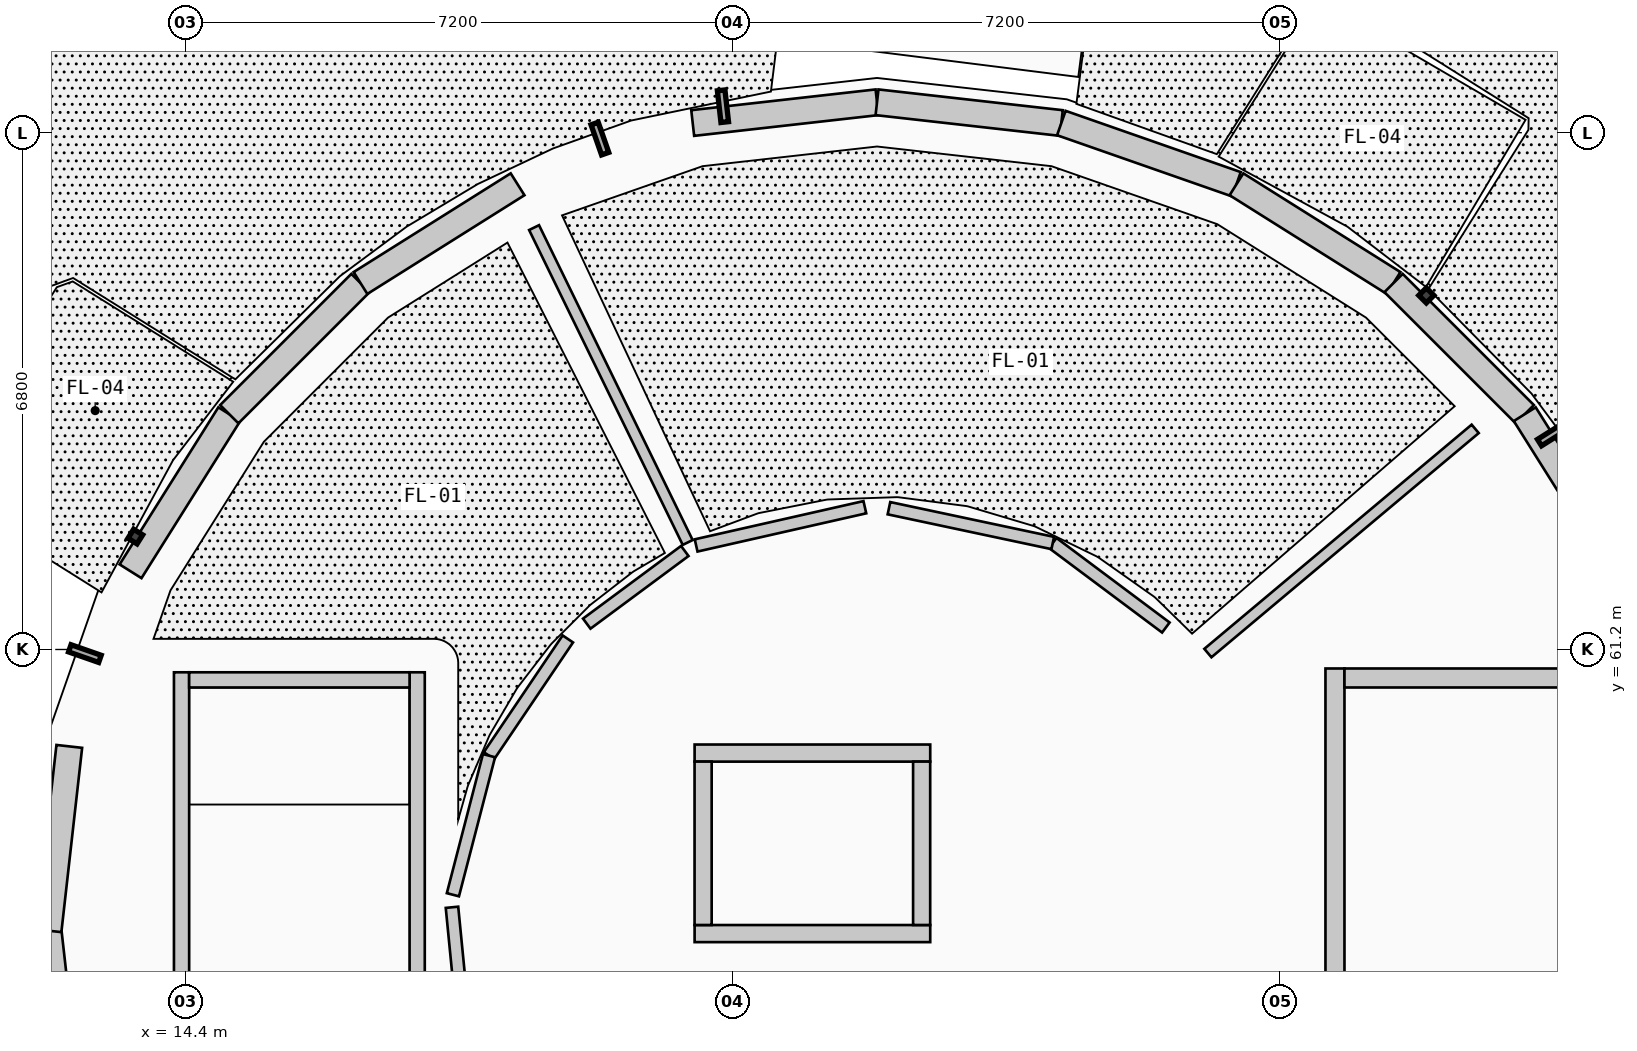
"""IFC4 building model, lengths in metres.
Left out: names, types, materials, properties, quantities, classifications, styles, units other than length and angle.
Written with IfcOpenShell. Run it as: python <this file> out.ifc"""

import sys

from ifc_helpers import new_model, si_unit, direction, frame, frame_2d, origin, origin_2d, place, context, subcontext, project, spatial, rectangle, circle, extrude, element, fill, save


model = new_model("IFC4")
c1 = context("Model", 3, precision=1e-05, world=origin(), true_north=direction((0.0, 1.0)))
c2 = subcontext(c1, "Body", "Model", "MODEL_VIEW")
j1 = project(units=[si_unit("LENGTHUNIT", "METRE"), si_unit("PLANEANGLEUNIT", "RADIAN")], contexts=[c1])
p1 = place(None, origin())
s1 = spatial("IfcSite", under=j1, at=p1, CompositionType="ELEMENT")
p2 = place(p1, origin())
s2 = spatial("IfcBuilding", under=s1, at=p2, CompositionType="ELEMENT")
p3 = place(p2, origin())
s3 = spatial("IfcBuildingStorey", under=s2, at=p3, CompositionType="ELEMENT", Elevation=0.0)
for number, where, z_axis, x_axis in (
    (1, (29.972, 65.615, 0.0), (0.0, 0.0, 1.0), (1.0, 0.0, 0.0)),
    (2, (25.81, 67.62, 0.0), (0.0, 0.0, 1.0), (1.0, 0.0, 0.0)),
    (3, (21.19, 67.62, 0.0), (0.0, 0.0, 1.0), (1.0, 0.0, 0.0)),
    (4, (17.028, 65.615, 0.0), (0.0, 0.0, 1.0), (1.0, 0.0, 0.0)),
    (5, (14.148, 62.004, 0.0), (0.0, 0.0, 1.0), (1.0, 0.0, 0.0)),
    (6, (13.12, 57.5, 0.0), (0.0, 0.0, 1.0), (1.0, 0.0, 0.0)),
):
    element("IfcColumn", number, at=place(p3, frame(where, z_axis=z_axis, x_axis=x_axis)), inside=s3, PredefinedType="PILASTER", context=c2, shape_type="SweptSolid", body=[
        extrude(circle(Radius=0.275, at=origin_2d()), origin(), (0.0, 0.0, 1.0), 4.55),
    ])
for number, where, z_axis, x_axis in (
    (7, (27.46, 61.46, 0.0), (0.0, 0.0, 1.0), (1.0, 0.0, 0.0)),
    (8, (23.5, 63.1, 0.0), (0.0, 0.0, 1.0), (1.0, 0.0, 0.0)),
    (9, (19.54, 61.46, 0.0), (0.0, 0.0, 1.0), (1.0, 0.0, 0.0)),
):
    element("IfcColumn", number, at=place(p3, frame(where, z_axis=z_axis, x_axis=x_axis)), inside=s3, PredefinedType="COLUMN", context=c2, shape_type="SweptSolid", body=[
        extrude(rectangle(XDim=0.315, YDim=0.315, at=origin_2d()), origin(), (0.0, 0.0, 1.0), 4.55),
    ])
p4 = place(p3, frame((25.966, 68.887, 0.0), z_axis=(0.0, 0.0, 1.0), x_axis=(1.0, 0.0, 0.0)))
e10 = element("IfcColumn", 10, at=p4, inside=s3, PredefinedType="PILASTER", context=c2, shape_type="SweptSolid", body=[
    extrude(circle(Radius=0.275, at=origin_2d()), origin(), (0.0, 0.0, 1.0), 4.55),
])
for number, where, z_axis, x_axis in (
    (11, (31.387, 67.39, 1.15), (0.0, 0.0, 1.0), (1.0, 0.0, 0.0)),
    (12, (15.613, 67.39, 1.15), (0.0, 0.0, 1.0), (1.0, 0.0, 0.0)),
):
    element("IfcColumn", number, at=place(p3, frame(where, z_axis=z_axis, x_axis=x_axis)), inside=s3, PredefinedType="PILASTER", context=c2, shape_type="SweptSolid", body=[
        extrude(circle(Radius=0.19, at=origin_2d()), origin(), (0.0, 0.0, 1.0), 3.4),
    ])
for number, where, z_axis, x_axis in (
    (13, (12.873, 55.075, 0.0), (0.0, 0.0, 1.0), (-0.112, 0.994, 0.0)),
    (14, (12.6, 57.5, 0.0), (0.0, 0.0, 1.0), (0.112, 0.994, 0.0)),
):
    element("IfcWall", number, at=place(p3, frame(where, z_axis=z_axis, x_axis=x_axis)), inside=s3, PredefinedType="SOLIDWALL", context=c2, shape_type="SweptSolid", body=[
        extrude(rectangle(XDim=2.44, YDim=0.34, at=frame_2d((1.22, 0.0))), origin(), (0.0, 0.0, 1.0), 3.659),
    ])
p5 = place(p3, frame((13.679, 62.229, 0.0), z_axis=(0.0, 0.0, 1.0), x_axis=(0.532136726684, 0.846658434148, 0.0)))
e15 = element("IfcWall", 15, at=p5, inside=s3, PredefinedType="SOLIDWALL", context=c2, shape_type="SweptSolid", body=[
    extrude(rectangle(XDim=2.441, YDim=0.34, at=frame_2d((1.221, 0.0))), origin(), (0.0, 0.0, 1.0), 3.659),
])
p6 = place(p5, frame((0.521, 0.0, 0.0)))
e16 = element("IfcOpeningElement", 16, at=p6, cuts=e15, PredefinedType="OPENING", context=c2, shape_type="SweptSolid", body=[
    extrude(rectangle(XDim=1.4, YDim=2.3, at=frame_2d((0.7, 1.15))), frame((0.0, 0.18, 0.0), z_axis=(0.0, -1.0, 0.0), x_axis=(1.0, 0.0, 0.0)), (0.0, 0.0, 1.0), 0.36),
])
p7 = place(p3, frame((14.978, 64.296, 0.0), z_axis=(0.0, 0.0, 1.0), x_axis=(0.707106781187, 0.707106781187, 0.0)))
e17 = element("IfcWall", 17, at=p7, inside=s3, PredefinedType="SOLIDWALL", context=c2, shape_type="SweptSolid", body=[
    extrude(rectangle(XDim=2.441, YDim=0.34, at=frame_2d((1.22, 0.0))), origin(), (0.0, 0.0, 1.0), 3.659),
])
p8 = place(p3, frame((16.704, 66.022, 0.0), z_axis=(0.0, 0.0, 1.0), x_axis=(0.846658434148, 0.532136726684, 0.0)))
e18 = element("IfcWall", 18, at=p8, inside=s3, PredefinedType="SOLIDWALL", context=c2, shape_type="SweptSolid", body=[
    extrude(rectangle(XDim=2.441, YDim=0.34, at=frame_2d((1.221, 0.0))), origin(), (0.0, 0.0, 1.0), 3.659),
])
for number, where, z_axis, x_axis in (
    (19, (21.075, 68.127, 0.0), (0.0, 0.0, 1.0), (0.994, 0.112, 0.0)),
    (20, (23.5, 68.4, 0.0), (0.0, 0.0, 1.0), (0.994, -0.112, 0.0)),
):
    element("IfcWall", number, at=place(p3, frame(where, z_axis=z_axis, x_axis=x_axis)), inside=s3, PredefinedType="SOLIDWALL", context=c2, shape_type="SweptSolid", body=[
        extrude(rectangle(XDim=2.44, YDim=0.34, at=frame_2d((1.22, 0.0))), origin(), (0.0, 0.0, 1.0), 3.659),
    ])
p9 = place(p3, frame((25.925, 68.127, 0.0), z_axis=(0.0, 0.0, 1.0), x_axis=(0.943919156274, -0.330176659411, 0.0)))
e21 = element("IfcWall", 21, at=p9, inside=s3, PredefinedType="SOLIDWALL", context=c2, shape_type="SweptSolid", body=[
    extrude(rectangle(XDim=2.441, YDim=0.34, at=frame_2d((1.22, 0.0))), origin(), (0.0, 0.0, 1.0), 3.659),
])
p10 = place(p3, frame((28.229, 67.321, 0.0), z_axis=(0.0, 0.0, 1.0), x_axis=(0.846658434148, -0.532136726684, 0.0)))
e22 = element("IfcWall", 22, at=p10, inside=s3, PredefinedType="SOLIDWALL", context=c2, shape_type="SweptSolid", body=[
    extrude(rectangle(XDim=2.441, YDim=0.34, at=frame_2d((1.221, 0.0))), origin(), (0.0, 0.0, 1.0), 3.659),
])
p11 = place(p10, frame((0.571, 0.0, 0.0)))
e23 = element("IfcOpeningElement", 23, at=p11, cuts=e22, PredefinedType="OPENING", context=c2, shape_type="SweptSolid", body=[
    extrude(rectangle(XDim=1.3, YDim=2.25, at=frame_2d((0.65, 1.125))), frame((0.0, 0.18, 0.0), z_axis=(0.0, -1.0, 0.0), x_axis=(1.0, 0.0, 0.0)), (0.0, 0.0, 1.0), 0.36),
])
p12 = place(p3, frame((30.296, 66.022, 0.0), z_axis=(0.0, 0.0, 1.0), x_axis=(0.707106781187, -0.707106781187, 0.0)))
e24 = element("IfcWall", 24, at=p12, inside=s3, PredefinedType="SOLIDWALL", context=c2, shape_type="SweptSolid", body=[
    extrude(rectangle(XDim=2.441, YDim=0.34, at=frame_2d((1.22, 0.0))), origin(), (0.0, 0.0, 1.0), 3.659),
])
p13 = place(p3, frame((32.022, 64.296, 0.0), z_axis=(0.0, 0.0, 1.0), x_axis=(0.532136726684, -0.846658434148, 0.0)))
e25 = element("IfcWall", 25, at=p13, inside=s3, PredefinedType="SOLIDWALL", context=c2, shape_type="SweptSolid", body=[
    extrude(rectangle(XDim=2.441, YDim=0.34, at=frame_2d((1.221, 0.0))), origin(), (0.0, 0.0, 1.0), 3.659),
])
p14 = place(p3, frame((29.525, 60.95, 0.0), z_axis=(0.0, 0.0, 1.0), x_axis=(0.0, -1.0, 0.0)))
e26 = element("IfcWall", 26, at=p14, inside=s3, PredefinedType="SHEAR", context=c2, shape_type="SweptSolid", body=[
    extrude(rectangle(XDim=6.9, YDim=0.25, at=frame_2d((3.45, 0.0))), origin(), (0.0, 0.0, 1.0), 4.305),
])
p15 = place(p14, frame((0.43, 0.0, 0.0)))
e27 = element("IfcOpeningElement", 27, at=p15, cuts=e26, PredefinedType="OPENING", context=c2, shape_type="SweptSolid", body=[
    extrude(rectangle(XDim=1.1, YDim=2.15, at=frame_2d((0.55, 1.075))), frame((0.0, 0.135, 0.0), z_axis=(0.0, -1.0, 0.0), x_axis=(1.0, 0.0, 0.0)), (0.0, 0.0, 1.0), 0.27),
])
p16 = place(p3, frame((29.65, 60.825, 0.0), z_axis=(0.0, 0.0, 1.0), x_axis=(1.0, 0.0, 0.0)))
e28 = element("IfcWall", 28, at=p16, inside=s3, PredefinedType="SHEAR", context=c2, shape_type="SweptSolid", body=[
    extrude(rectangle(XDim=2.9, YDim=0.25, at=frame_2d((1.45, 0.0))), origin(), (0.0, 0.0, 1.0), 4.305),
])
p17 = place(p3, frame((17.45, 54.1, 0.0), z_axis=(0.0, 0.0, 1.0), x_axis=(0.0, 1.0, 0.0)))
e29 = element("IfcWall", 29, at=p17, inside=s3, PredefinedType="SHEAR", context=c2, shape_type="SweptSolid", body=[
    extrude(rectangle(XDim=6.8, YDim=0.2, at=frame_2d((3.4, 0.0))), origin(), (0.0, 0.0, 1.0), 4.305),
])
p18 = place(p17, frame((0.38, 0.0, 0.0)))
e30 = element("IfcOpeningElement", 30, at=p18, cuts=e29, PredefinedType="OPENING", context=c2, shape_type="SweptSolid", body=[
    extrude(rectangle(XDim=1.05, YDim=2.15, at=frame_2d((0.525, 1.075))), frame((0.0, 0.11, 0.0), z_axis=(0.0, -1.0, 0.0), x_axis=(1.0, 0.0, 0.0)), (0.0, 0.0, 1.0), 0.22),
])
p19 = place(p3, frame((14.35, 54.1, 0.0), z_axis=(0.0, 0.0, 1.0), x_axis=(0.0, 1.0, 0.0)))
e31 = element("IfcWall", 31, at=p19, inside=s3, PredefinedType="SHEAR", context=c2, shape_type="SweptSolid", body=[
    extrude(rectangle(XDim=6.8, YDim=0.2, at=frame_2d((3.4, 0.0))), origin(), (0.0, 0.0, 1.0), 4.305),
])
p20 = place(p3, frame((17.35, 60.8, 0.0), z_axis=(0.0, 0.0, 1.0), x_axis=(-1.0, 0.0, 0.0)))
e32 = element("IfcWall", 32, at=p20, inside=s3, PredefinedType="SHEAR", context=c2, shape_type="SweptSolid", body=[
    extrude(rectangle(XDim=2.9, YDim=0.2, at=frame_2d((1.45, 0.0))), origin(), (0.0, 0.0, 1.0), 4.305),
])
p21 = place(p3, frame((21.1, 57.462, 0.0), z_axis=(0.0, 0.0, 1.0), x_axis=(1.0, 0.0, 0.0)))
e33 = element("IfcWall", 33, at=p21, inside=s3, PredefinedType="SHEAR", context=c2, shape_type="SweptSolid", body=[
    extrude(rectangle(XDim=3.1, YDim=0.225, at=frame_2d((1.55, 0.0))), origin(), (0.0, 0.0, 1.0), 4.305),
])
p22 = place(p21, frame((0.95, 0.0, 0.0)))
e34 = element("IfcOpeningElement", 34, at=p22, cuts=e33, PredefinedType="OPENING", context=c2, shape_type="SweptSolid", body=[
    extrude(rectangle(XDim=1.2, YDim=2.2, at=frame_2d((0.6, 1.1))), frame((0.0, 0.123, 0.0), z_axis=(0.0, -1.0, 0.0), x_axis=(1.0, 0.0, 0.0)), (0.0, 0.0, 1.0), 0.245),
])
p23 = place(p3, frame((21.1, 59.837, 0.0), z_axis=(0.0, 0.0, 1.0), x_axis=(1.0, 0.0, 0.0)))
e35 = element("IfcWall", 35, at=p23, inside=s3, PredefinedType="SHEAR", context=c2, shape_type="SweptSolid", body=[
    extrude(rectangle(XDim=3.1, YDim=0.225, at=frame_2d((1.55, 0.0))), origin(), (0.0, 0.0, 1.0), 4.305),
])
for number, where, z_axis, x_axis in (
    (36, (21.212, 57.575, 0.0), (0.0, 0.0, 1.0), (0.0, 1.0, 0.0)),
    (37, (24.087, 57.575, 0.0), (0.0, 0.0, 1.0), (0.0, 1.0, 0.0)),
):
    element("IfcWall", number, at=place(p3, frame(where, z_axis=z_axis, x_axis=x_axis)), inside=s3, PredefinedType="SHEAR", context=c2, shape_type="SweptSolid", body=[
        extrude(rectangle(XDim=2.15, YDim=0.225, at=frame_2d((1.075, 0.0))), origin(), (0.0, 0.0, 1.0), 4.305),
    ])
p24 = place(p3, frame((27.853, 61.153, 0.0), z_axis=(0.0, 0.0, 1.0), x_axis=(0.766177182771, 0.64262938355, 0.0)))
e38 = element("IfcWall", 38, at=p24, inside=s3, PredefinedType="PARTITIONING", context=c2, shape_type="SweptSolid", body=[
    extrude(rectangle(XDim=4.59, YDim=0.145, at=frame_2d((2.295, 0.0))), origin(), (0.0, 0.0, 1.0), 3.634),
])
p25 = place(p3, frame((21.009, 62.608, 0.0), z_axis=(0.0, 0.0, 1.0), x_axis=(-0.438421545089, 0.898769463657, 0.0)))
e39 = element("IfcWall", 39, at=p25, inside=s3, PredefinedType="PARTITIONING", context=c2, shape_type="SweptSolid", body=[
    extrude(rectangle(XDim=4.61, YDim=0.145, at=frame_2d((2.305, 0.0))), origin(), (0.0, 0.0, 1.0), 3.634),
])
p26 = place(p3, frame((27.3, 61.489, 0.0), z_axis=(0.0, 0.0, 1.0), x_axis=(-0.801023932766, 0.598632323831, 0.0)))
e40 = element("IfcWall", 40, at=p26, inside=s3, PredefinedType="PARTITIONING", context=c2, shape_type="SweptSolid", body=[
    extrude(rectangle(XDim=1.858, YDim=0.165, at=frame_2d((0.929, 0.0))), origin(), (0.0, 0.0, 1.0), 3.634),
])
p27 = place(p26, frame((0.289, 0.0, 0.0)))
e41 = element("IfcOpeningElement", 41, at=p27, cuts=e40, PredefinedType="OPENING", context=c2, shape_type="SweptSolid", body=[
    extrude(rectangle(XDim=1.28, YDim=2.3, at=frame_2d((0.64, 1.15))), frame((0.0, 0.093, 0.0), z_axis=(0.0, -1.0, 0.0), x_axis=(1.0, 0.0, 0.0)), (0.0, 0.0, 1.0), 0.185),
])
p28 = place(p3, frame((25.812, 62.601, 0.0), z_axis=(0.0, 0.0, 1.0), x_axis=(-0.978152936259, 0.207886587563, 0.0)))
e42 = element("IfcWall", 42, at=p28, inside=s3, PredefinedType="PARTITIONING", context=c2, shape_type="SweptSolid", body=[
    extrude(rectangle(XDim=2.203, YDim=0.165, at=frame_2d((1.102, 0.0))), origin(), (0.0, 0.0, 1.0), 3.634),
])
p29 = place(p3, frame((23.34, 63.072, 0.0), z_axis=(0.0, 0.0, 1.0), x_axis=(-0.975285396453, -0.2209488526, 0.0)))
e43 = element("IfcWall", 43, at=p29, inside=s3, PredefinedType="PARTITIONING", context=c2, shape_type="SweptSolid", body=[
    extrude(rectangle(XDim=2.276, YDim=0.165, at=frame_2d((1.138, 0.0))), origin(), (0.0, 0.0, 1.0), 3.634),
])
p30 = place(p3, frame((20.971, 62.496, 0.0), z_axis=(0.0, 0.0, 1.0), x_axis=(-0.803417109956, -0.59541661669, 0.0)))
e44 = element("IfcWall", 44, at=p30, inside=s3, PredefinedType="PARTITIONING", context=c2, shape_type="SweptSolid", body=[
    extrude(rectangle(XDim=1.606, YDim=0.165, at=frame_2d((0.803, 0.0))), origin(), (0.0, 0.0, 1.0), 3.634),
])
p31 = place(p30, frame((0.353, 0.0, 0.0)))
e45 = element("IfcOpeningElement", 45, at=p31, cuts=e44, PredefinedType="OPENING", context=c2, shape_type="SweptSolid", body=[
    extrude(rectangle(XDim=0.9, YDim=2.1, at=frame_2d((0.45, 1.05))), frame((0.0, 0.093, 0.0), z_axis=(0.0, -1.0, 0.0), x_axis=(1.0, 0.0, 0.0)), (0.0, 0.0, 1.0), 0.185),
])
p32 = place(p3, frame((19.432, 61.339, 0.0), z_axis=(0.0, 0.0, 1.0), x_axis=(-0.559463805142, -0.828854782659, 0.0)))
e46 = element("IfcWall", 46, at=p32, inside=s3, PredefinedType="PARTITIONING", context=c2, shape_type="SweptSolid", body=[
    extrude(rectangle(XDim=1.853, YDim=0.165, at=frame_2d((0.927, 0.0))), origin(), (0.0, 0.0, 1.0), 3.634),
])
p33 = place(p3, frame((18.395, 59.803, 0.0), z_axis=(0.0, 0.0, 1.0), x_axis=(-0.251275827958, -0.967915522287, 0.0)))
e47 = element("IfcWall", 47, at=p33, inside=s3, PredefinedType="PARTITIONING", context=c2, shape_type="SweptSolid", body=[
    extrude(rectangle(XDim=1.891, YDim=0.165, at=frame_2d((0.945, 0.0))), origin(), (0.0, 0.0, 1.0), 3.634),
])
p34 = place(p3, frame((17.908, 57.808, 0.0), z_axis=(0.0, 0.0, 1.0), x_axis=(0.097655572539, -0.995220271675, 0.0)))
e48 = element("IfcWall", 48, at=p34, inside=s3, PredefinedType="PARTITIONING", context=c2, shape_type="SweptSolid", body=[
    extrude(rectangle(XDim=1.465, YDim=0.165, at=frame_2d((0.732, 0.0))), origin(), (0.0, 0.0, 1.0), 3.634),
])
p35 = place(p6, origin())
e49 = element("IfcDoor", 49, at=p35, inside=s3, OperationType="SINGLE_SWING_LEFT", PredefinedType="DOOR", context=c2, shape_type="SweptSolid", body=[
    extrude(rectangle(XDim=1.4, YDim=2.3, at=frame_2d((0.7, 1.15))), frame((0.0, 0.025, 0.0), z_axis=(0.0, -1.0, 0.0), x_axis=(1.0, 0.0, 0.0)), (0.0, 0.0, 1.0), 0.05),
])
fill(e16, e49)
p36 = place(p11, origin())
e50 = element("IfcDoor", 50, at=p36, inside=s3, OperationType="SINGLE_SWING_RIGHT", PredefinedType="DOOR", context=c2, shape_type="SweptSolid", body=[
    extrude(rectangle(XDim=1.3, YDim=2.25, at=frame_2d((0.65, 1.125))), frame((0.0, 0.025, 0.0), z_axis=(0.0, -1.0, 0.0), x_axis=(1.0, 0.0, 0.0)), (0.0, 0.0, 1.0), 0.05),
])
fill(e23, e50)
p37 = place(p15, origin())
e51 = element("IfcDoor", 51, at=p37, inside=s3, OperationType="SINGLE_SWING_RIGHT", PredefinedType="DOOR", context=c2, shape_type="SweptSolid", body=[
    extrude(rectangle(XDim=1.1, YDim=2.15, at=frame_2d((0.55, 1.075))), frame((0.0, 0.025, 0.0), z_axis=(0.0, -1.0, 0.0), x_axis=(1.0, 0.0, 0.0)), (0.0, 0.0, 1.0), 0.05),
])
fill(e27, e51)
p38 = place(p22, origin())
e52 = element("IfcDoor", 52, at=p38, inside=s3, OperationType="DOUBLE_DOOR_SLIDING", PredefinedType="DOOR", context=c2, shape_type="SweptSolid", body=[
    extrude(rectangle(XDim=1.2, YDim=2.2, at=frame_2d((0.6, 1.1))), frame((0.0, 0.025, 0.0), z_axis=(0.0, -1.0, 0.0), x_axis=(1.0, 0.0, 0.0)), (0.0, 0.0, 1.0), 0.05),
])
fill(e34, e52)
p39 = place(p27, origin())
e53 = element("IfcDoor", 53, at=p39, inside=s3, OperationType="SINGLE_SWING_LEFT", PredefinedType="DOOR", context=c2, shape_type="SweptSolid", body=[
    extrude(rectangle(XDim=1.28, YDim=2.3, at=frame_2d((0.64, 1.15))), frame((0.0, 0.025, 0.0), z_axis=(0.0, -1.0, 0.0), x_axis=(1.0, 0.0, 0.0)), (0.0, 0.0, 1.0), 0.05),
])
fill(e41, e53)
p40 = place(p31, origin())
e54 = element("IfcDoor", 54, at=p40, inside=s3, OperationType="SINGLE_SWING_RIGHT", PredefinedType="DOOR", context=c2, shape_type="SweptSolid", body=[
    extrude(rectangle(XDim=0.9, YDim=2.1, at=frame_2d((0.45, 1.05))), frame((0.0, 0.025, 0.0), z_axis=(0.0, -1.0, 0.0), x_axis=(1.0, 0.0, 0.0)), (0.0, 0.0, 1.0), 0.05),
])
fill(e45, e54)
save(model, sys.argv[1])
